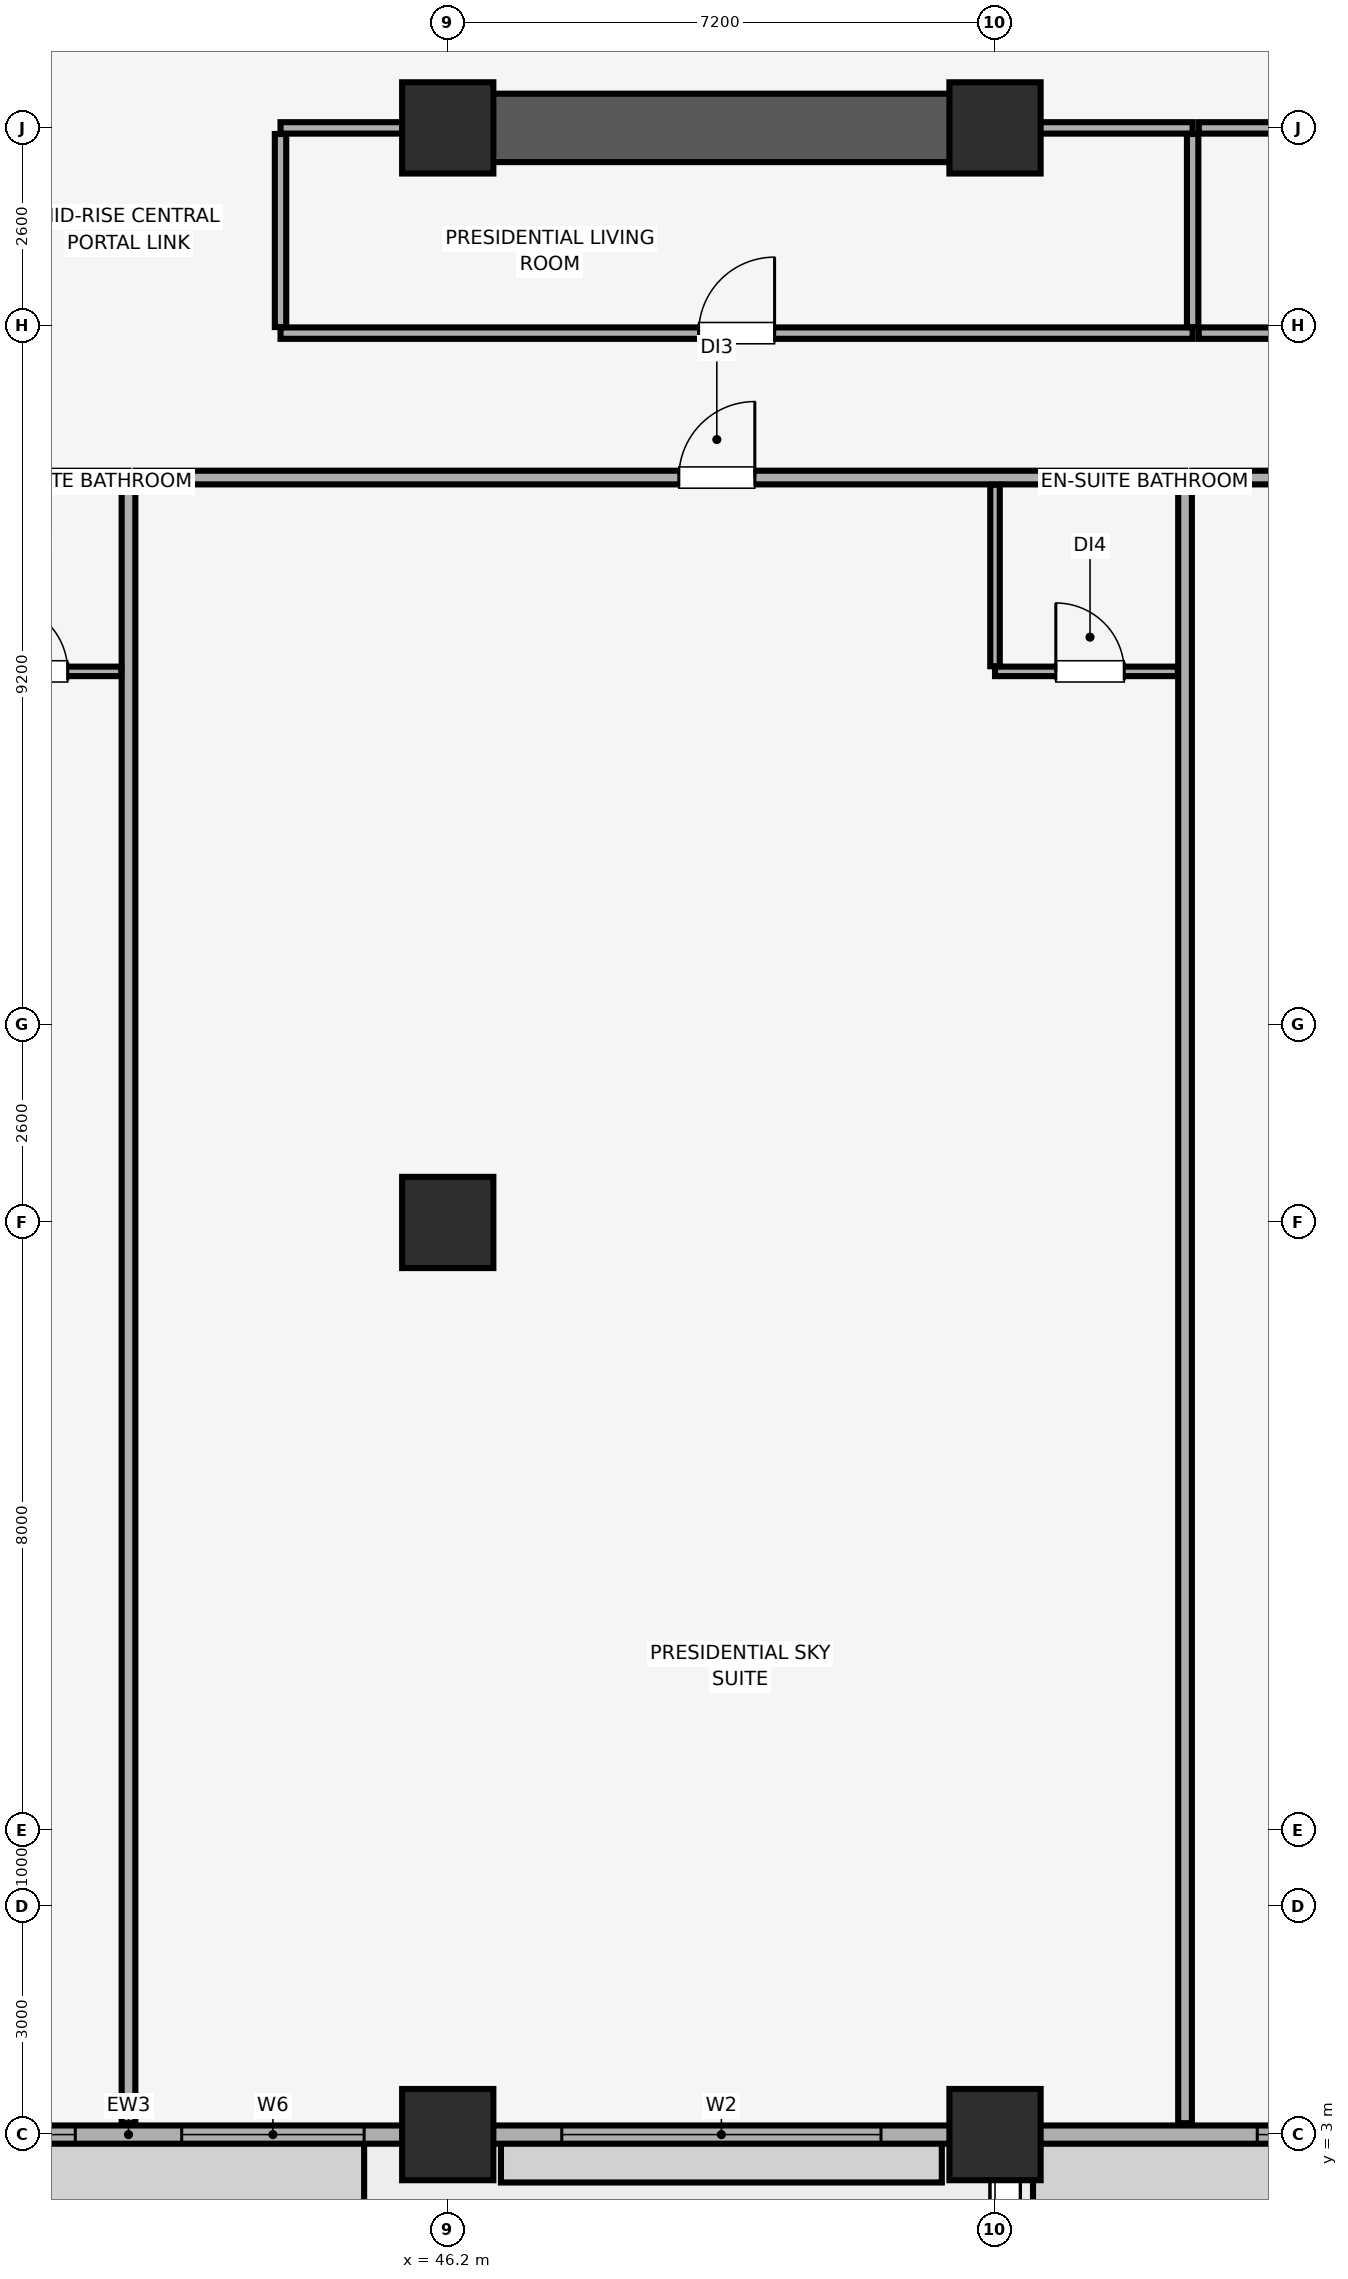
"""IFC4 building model, lengths in metres.
Left out: names, types, materials, properties, quantities, classifications, styles, units other than length and angle.
Written with IfcOpenShell. Run it as: python <this file> out.ifc"""

import sys

from ifc_helpers import new_model, si_unit, direction, frame, frame_2d, origin, origin_2d, place, context, subcontext, project, spatial, rectangle, extrude, element, fill, save


model = new_model("IFC4")
c1 = context("Model", 3, precision=1e-05, world=origin(), true_north=direction((0.0, 1.0)))
c2 = subcontext(c1, "Body", "Model", "MODEL_VIEW")
j1 = project(units=[si_unit("LENGTHUNIT", "METRE"), si_unit("PLANEANGLEUNIT", "RADIAN")], contexts=[c1])
p1 = place(None, origin())
s1 = spatial("IfcSite", under=j1, at=p1, CompositionType="ELEMENT")
p2 = place(p1, origin())
s2 = spatial("IfcBuilding", under=s1, at=p2, CompositionType="ELEMENT")
p3 = place(p2, frame((0.0, 0.0, 220.55)))
s3 = spatial("IfcBuildingStorey", under=s2, at=p3, CompositionType="ELEMENT", Elevation=220.55)
for number, where, z_axis, x_axis in (
    (1, (46.2, 3.0, 0.0), (0.0, 0.0, 1.0), (1.0, 0.0, 0.0)),
    (2, (53.4, 3.0, 0.0), (0.0, 0.0, 1.0), (1.0, 0.0, 0.0)),
    (3, (46.2, 15.0, 0.0), (0.0, 0.0, 1.0), (1.0, 0.0, 0.0)),
    (4, (46.2, 29.4, 0.0), (0.0, 0.0, 1.0), (1.0, 0.0, 0.0)),
    (5, (53.4, 29.4, 0.0), (0.0, 0.0, 1.0), (1.0, 0.0, 0.0)),
):
    element("IfcColumn", number, at=place(p3, frame(where, z_axis=z_axis, x_axis=x_axis)), inside=s3, PredefinedType="COLUMN", context=c2, shape_type="SweptSolid", body=[
        extrude(rectangle(XDim=1.2, YDim=1.2, at=origin_2d()), origin(), (0.0, 0.0, 1.0), 3.56),
    ])
p4 = place(p3, frame((7.0, 3.0, 0.0), z_axis=(0.0, 0.0, 1.0), x_axis=(1.0, 0.0, 0.0)))
e6 = element("IfcWall", 6, at=p4, inside=s3, PredefinedType="SOLIDWALL", context=c2, shape_type="SweptSolid", body=[
    extrude(rectangle(XDim=70.0, YDim=0.24, at=frame_2d((35.0, 0.0))), origin(), (0.0, 0.0, 1.0), 2.76),
])
p5 = place(p4, frame((17.86, 0.0, 0.0)))
e7 = element("IfcOpeningElement", 7, at=p5, cuts=e6, PredefinedType="OPENING", context=c2, shape_type="SweptSolid", body=[
    extrude(rectangle(XDim=1.1, YDim=2.15, at=frame_2d((0.55, 1.075))), frame((0.0, 0.13, 0.0), z_axis=(0.0, -1.0, 0.0), x_axis=(1.0, 0.0, 0.0)), (0.0, 0.0, 1.0), 0.26),
])
p6 = place(p4, frame((26.317, 0.0, 0.0)))
e8 = element("IfcOpeningElement", 8, at=p6, cuts=e6, PredefinedType="OPENING", context=c2, shape_type="SweptSolid", body=[
    extrude(rectangle(XDim=1.1, YDim=2.15, at=frame_2d((0.55, 1.075))), frame((0.0, 0.13, 0.0), z_axis=(0.0, -1.0, 0.0), x_axis=(1.0, 0.0, 0.0)), (0.0, 0.0, 1.0), 0.26),
])
p7 = place(p4, frame((57.517, 0.0, 0.0)))
e9 = element("IfcOpeningElement", 9, at=p7, cuts=e6, PredefinedType="OPENING", context=c2, shape_type="SweptSolid", body=[
    extrude(rectangle(XDim=1.1, YDim=2.15, at=frame_2d((0.55, 1.075))), frame((0.0, 0.13, 0.0), z_axis=(0.0, -1.0, 0.0), x_axis=(1.0, 0.0, 0.0)), (0.0, 0.0, 1.0), 0.26),
])
p8 = place(p4, frame((5.2, 0.0, 0.85)))
e10 = element("IfcOpeningElement", 10, at=p8, cuts=e6, PredefinedType="OPENING", context=c2, shape_type="SweptSolid", body=[
    extrude(rectangle(XDim=1.5, YDim=1.4, at=frame_2d((0.75, 0.7))), frame((0.0, 0.13, 0.0), z_axis=(0.0, -1.0, 0.0), x_axis=(1.0, 0.0, 0.0)), (0.0, 0.0, 1.0), 0.26),
])
p9 = place(p4, frame((10.7, 0.0, 0.85)))
e11 = element("IfcOpeningElement", 11, at=p9, cuts=e6, PredefinedType="OPENING", context=c2, shape_type="SweptSolid", body=[
    extrude(rectangle(XDim=4.2, YDim=1.65, at=frame_2d((2.1, 0.825))), frame((0.0, 0.13, 0.0), z_axis=(0.0, -1.0, 0.0), x_axis=(1.0, 0.0, 0.0)), (0.0, 0.0, 1.0), 0.26),
])
p10 = place(p4, frame((28.243, 0.0, 0.85)))
e12 = element("IfcOpeningElement", 12, at=p10, cuts=e6, PredefinedType="OPENING", context=c2, shape_type="SweptSolid", body=[
    extrude(rectangle(XDim=1.5, YDim=1.4, at=frame_2d((0.75, 0.7))), frame((0.0, 0.13, 0.0), z_axis=(0.0, -1.0, 0.0), x_axis=(1.0, 0.0, 0.0)), (0.0, 0.0, 1.0), 0.26),
])
p11 = place(p4, frame((31.9, 0.0, 0.85)))
e13 = element("IfcOpeningElement", 13, at=p11, cuts=e6, PredefinedType="OPENING", context=c2, shape_type="SweptSolid", body=[
    extrude(rectangle(XDim=2.4, YDim=1.5, at=frame_2d((1.2, 0.75))), frame((0.0, 0.13, 0.0), z_axis=(0.0, -1.0, 0.0), x_axis=(1.0, 0.0, 0.0)), (0.0, 0.0, 1.0), 0.26),
])
p12 = place(p4, frame((35.7, 0.0, 0.85)))
e14 = element("IfcOpeningElement", 14, at=p12, cuts=e6, PredefinedType="OPENING", context=c2, shape_type="SweptSolid", body=[
    extrude(rectangle(XDim=2.4, YDim=1.5, at=frame_2d((1.2, 0.75))), frame((0.0, 0.13, 0.0), z_axis=(0.0, -1.0, 0.0), x_axis=(1.0, 0.0, 0.0)), (0.0, 0.0, 1.0), 0.26),
])
p13 = place(p4, frame((40.7, 0.0, 0.85)))
e15 = element("IfcOpeningElement", 15, at=p13, cuts=e6, PredefinedType="OPENING", context=c2, shape_type="SweptSolid", body=[
    extrude(rectangle(XDim=4.2, YDim=1.65, at=frame_2d((2.1, 0.825))), frame((0.0, 0.13, 0.0), z_axis=(0.0, -1.0, 0.0), x_axis=(1.0, 0.0, 0.0)), (0.0, 0.0, 1.0), 0.26),
])
p14 = place(p4, frame((49.85, 0.0, 0.85)))
e16 = element("IfcOpeningElement", 16, at=p14, cuts=e6, PredefinedType="OPENING", context=c2, shape_type="SweptSolid", body=[
    extrude(rectangle(XDim=2.4, YDim=1.5, at=frame_2d((1.2, 0.75))), frame((0.0, 0.13, 0.0), z_axis=(0.0, -1.0, 0.0), x_axis=(1.0, 0.0, 0.0)), (0.0, 0.0, 1.0), 0.26),
])
p15 = place(p4, frame((54.473, 0.0, 0.85)))
e17 = element("IfcOpeningElement", 17, at=p15, cuts=e6, PredefinedType="OPENING", context=c2, shape_type="SweptSolid", body=[
    extrude(rectangle(XDim=2.4, YDim=1.5, at=frame_2d((1.2, 0.75))), frame((0.0, 0.13, 0.0), z_axis=(0.0, -1.0, 0.0), x_axis=(1.0, 0.0, 0.0)), (0.0, 0.0, 1.0), 0.26),
])
p16 = place(p4, frame((63.3, 0.0, 0.85)))
e18 = element("IfcOpeningElement", 18, at=p16, cuts=e6, PredefinedType="OPENING", context=c2, shape_type="SweptSolid", body=[
    extrude(rectangle(XDim=1.5, YDim=1.4, at=frame_2d((0.75, 0.7))), frame((0.0, 0.13, 0.0), z_axis=(0.0, -1.0, 0.0), x_axis=(1.0, 0.0, 0.0)), (0.0, 0.0, 1.0), 0.26),
])
p17 = place(p3, frame((46.0, 29.4, 0.0), z_axis=(0.0, 0.0, 1.0), x_axis=(1.0, 0.0, 0.0)))
e19 = element("IfcWall", 19, at=p17, inside=s3, PredefinedType="SHEAR", context=c2, shape_type="SweptSolid", body=[
    extrude(rectangle(XDim=7.6, YDim=0.9, at=frame_2d((3.8, 0.0))), origin(), (0.0, 0.0, 1.0), 3.56),
])
p18 = place(p3, frame((28.195, 24.8, 0.0), z_axis=(0.0, 0.0, 1.0), x_axis=(1.0, 0.0, 0.0)))
e20 = element("IfcWall", 20, at=p18, inside=s3, PredefinedType="PARTITIONING", context=c2, shape_type="SweptSolid", body=[
    extrude(rectangle(XDim=13.805, YDim=0.18, at=frame_2d((6.902, 0.0))), origin(), (0.0, 0.0, 1.0), 3.56),
])
p19 = place(p18, frame((5.505, 0.0, 0.0)))
e21 = element("IfcOpeningElement", 21, at=p19, cuts=e20, PredefinedType="OPENING", context=c2, shape_type="SweptSolid", body=[
    extrude(rectangle(XDim=1.0, YDim=2.15, at=frame_2d((0.5, 1.075))), frame((0.0, 0.1, 0.0), z_axis=(0.0, -1.0, 0.0), x_axis=(1.0, 0.0, 0.0)), (0.0, 0.0, 1.0), 0.2),
])
p20 = place(p3, frame((42.0, 3.15, 0.0), z_axis=(0.0, 0.0, 1.0), x_axis=(0.0, 1.0, 0.0)))
e22 = element("IfcWall", 22, at=p20, inside=s3, PredefinedType="PARTITIONING", context=c2, shape_type="SweptSolid", body=[
    extrude(rectangle(XDim=21.555, YDim=0.18, at=frame_2d((10.778, 0.0))), origin(), (0.0, 0.0, 1.0), 2.96),
])
p21 = place(p3, frame((39.5, 22.25, 0.0), z_axis=(0.0, 0.0, 1.0), x_axis=(1.0, 0.0, 0.0)))
e23 = element("IfcWall", 23, at=p21, inside=s3, PredefinedType="PARTITIONING", context=c2, shape_type="SweptSolid", body=[
    extrude(rectangle(XDim=2.405, YDim=0.125, at=frame_2d((1.203, 0.0))), origin(), (0.0, 0.0, 1.0), 3.56),
])
p22 = place(p21, frame((0.8, 0.0, 0.0)))
e24 = element("IfcOpeningElement", 24, at=p22, cuts=e23, PredefinedType="OPENING", context=c2, shape_type="SweptSolid", body=[
    extrude(rectangle(XDim=0.9, YDim=2.1, at=frame_2d((0.45, 1.05))), frame((0.0, 0.073, 0.0), z_axis=(0.0, -1.0, 0.0), x_axis=(1.0, 0.0, 0.0)), (0.0, 0.0, 1.0), 0.145),
])
p23 = place(p3, frame((42.095, 24.8, 0.0), z_axis=(0.0, 0.0, 1.0), x_axis=(1.0, 0.0, 0.0)))
e25 = element("IfcWall", 25, at=p23, inside=s3, PredefinedType="PARTITIONING", context=c2, shape_type="SweptSolid", body=[
    extrude(rectangle(XDim=13.805, YDim=0.18, at=frame_2d((6.902, 0.0))), origin(), (0.0, 0.0, 1.0), 3.56),
])
p24 = place(p23, frame((7.145, 0.0, 0.0)))
e26 = element("IfcOpeningElement", 26, at=p24, cuts=e25, PredefinedType="OPENING", context=c2, shape_type="SweptSolid", body=[
    extrude(rectangle(XDim=1.0, YDim=2.15, at=frame_2d((0.5, 1.075))), frame((0.0, 0.1, 0.0), z_axis=(0.0, -1.0, 0.0), x_axis=(1.0, 0.0, 0.0)), (0.0, 0.0, 1.0), 0.2),
])
p25 = place(p3, frame((55.9, 3.15, 0.0), z_axis=(0.0, 0.0, 1.0), x_axis=(0.0, 1.0, 0.0)))
e27 = element("IfcWall", 27, at=p25, inside=s3, PredefinedType="PARTITIONING", context=c2, shape_type="SweptSolid", body=[
    extrude(rectangle(XDim=21.555, YDim=0.18, at=frame_2d((10.778, 0.0))), origin(), (0.0, 0.0, 1.0), 3.56),
])
p26 = place(p3, frame((53.4, 22.25, 0.0), z_axis=(0.0, 0.0, 1.0), x_axis=(1.0, 0.0, 0.0)))
e28 = element("IfcWall", 28, at=p26, inside=s3, PredefinedType="PARTITIONING", context=c2, shape_type="SweptSolid", body=[
    extrude(rectangle(XDim=2.405, YDim=0.125, at=frame_2d((1.203, 0.0))), origin(), (0.0, 0.0, 1.0), 3.56),
])
p27 = place(p26, frame((0.8, 0.0, 0.0)))
e29 = element("IfcOpeningElement", 29, at=p27, cuts=e28, PredefinedType="OPENING", context=c2, shape_type="SweptSolid", body=[
    extrude(rectangle(XDim=0.9, YDim=2.1, at=frame_2d((0.45, 1.05))), frame((0.0, 0.073, 0.0), z_axis=(0.0, -1.0, 0.0), x_axis=(1.0, 0.0, 0.0)), (0.0, 0.0, 1.0), 0.145),
])
p28 = place(p3, frame((53.4, 22.317, 0.0), z_axis=(0.0, 0.0, 1.0), x_axis=(0.0, 1.0, 0.0)))
e30 = element("IfcWall", 30, at=p28, inside=s3, PredefinedType="PARTITIONING", context=c2, shape_type="SweptSolid", body=[
    extrude(rectangle(XDim=2.388, YDim=0.125, at=frame_2d((1.194, 0.0))), origin(), (0.0, 0.0, 1.0), 3.06),
])
p29 = place(p3, frame((55.995, 24.8, 0.0), z_axis=(0.0, 0.0, 1.0), x_axis=(1.0, 0.0, 0.0)))
e31 = element("IfcWall", 31, at=p29, inside=s3, PredefinedType="PARTITIONING", context=c2, shape_type="SweptSolid", body=[
    extrude(rectangle(XDim=13.805, YDim=0.18, at=frame_2d((6.902, 0.0))), origin(), (0.0, 0.0, 1.0), 3.56),
])
p30 = place(p29, frame((7.395, 0.0, 0.0)))
e32 = element("IfcOpeningElement", 32, at=p30, cuts=e31, PredefinedType="OPENING", context=c2, shape_type="SweptSolid", body=[
    extrude(rectangle(XDim=1.0, YDim=2.15, at=frame_2d((0.5, 1.075))), frame((0.0, 0.1, 0.0), z_axis=(0.0, -1.0, 0.0), x_axis=(1.0, 0.0, 0.0)), (0.0, 0.0, 1.0), 0.2),
])
p31 = place(p3, frame((44.0, 26.7, 0.0), z_axis=(0.0, 0.0, 1.0), x_axis=(1.0, 0.0, 0.0)))
e33 = element("IfcWall", 33, at=p31, inside=s3, PredefinedType="PARTITIONING", context=c2, shape_type="SweptSolid", body=[
    extrude(rectangle(XDim=12.0, YDim=0.15, at=frame_2d((6.0, 0.0))), origin(), (0.0, 0.0, 1.0), 3.56),
])
p32 = place(p31, frame((5.5, 0.0, 0.0)))
e34 = element("IfcOpeningElement", 34, at=p32, cuts=e33, PredefinedType="OPENING", context=c2, shape_type="SweptSolid", body=[
    extrude(rectangle(XDim=1.0, YDim=2.15, at=frame_2d((0.5, 1.075))), frame((0.0, 0.085, 0.0), z_axis=(0.0, -1.0, 0.0), x_axis=(1.0, 0.0, 0.0)), (0.0, 0.0, 1.0), 0.17),
])
p33 = place(p3, frame((44.0, 29.4, 0.0), z_axis=(0.0, 0.0, 1.0), x_axis=(1.0, 0.0, 0.0)))
e35 = element("IfcWall", 35, at=p33, inside=s3, PredefinedType="PARTITIONING", context=c2, shape_type="SweptSolid", body=[
    extrude(rectangle(XDim=1.99, YDim=0.15, at=frame_2d((0.995, 0.0))), origin(), (0.0, 0.0, 1.0), 2.46),
])
p34 = place(p3, frame((53.61, 29.4, 0.0), z_axis=(0.0, 0.0, 1.0), x_axis=(1.0, 0.0, 0.0)))
e36 = element("IfcWall", 36, at=p34, inside=s3, PredefinedType="PARTITIONING", context=c2, shape_type="SweptSolid", body=[
    extrude(rectangle(XDim=2.39, YDim=0.15, at=frame_2d((1.195, 0.0))), origin(), (0.0, 0.0, 1.0), 2.46),
])
for number, where, z_axis, x_axis in (
    (37, (44.0, 26.78, 0.0), (0.0, 0.0, 1.0), (0.0, 1.0, 0.0)),
    (38, (56.0, 26.78, 0.0), (0.0, 0.0, 1.0), (0.0, 1.0, 0.0)),
):
    element("IfcWall", number, at=place(p3, frame(where, z_axis=z_axis, x_axis=x_axis)), inside=s3, PredefinedType="PARTITIONING", context=c2, shape_type="SweptSolid", body=[
        extrude(rectangle(XDim=2.54, YDim=0.15, at=frame_2d((1.27, 0.0))), origin(), (0.0, 0.0, 1.0), 3.56),
    ])
p35 = place(p3, frame((56.08, 26.7, 0.0), z_axis=(0.0, 0.0, 1.0), x_axis=(1.0, 0.0, 0.0)))
e39 = element("IfcWall", 39, at=p35, inside=s3, PredefinedType="PARTITIONING", context=c2, shape_type="SweptSolid", body=[
    extrude(rectangle(XDim=11.92, YDim=0.15, at=frame_2d((5.96, 0.0))), origin(), (0.0, 0.0, 1.0), 3.56),
])
p36 = place(p35, frame((5.42, 0.0, 0.0)))
e40 = element("IfcOpeningElement", 40, at=p36, cuts=e39, PredefinedType="OPENING", context=c2, shape_type="SweptSolid", body=[
    extrude(rectangle(XDim=1.0, YDim=2.15, at=frame_2d((0.5, 1.075))), frame((0.0, 0.085, 0.0), z_axis=(0.0, -1.0, 0.0), x_axis=(1.0, 0.0, 0.0)), (0.0, 0.0, 1.0), 0.17),
])
p37 = place(p3, frame((56.08, 29.4, 0.0), z_axis=(0.0, 0.0, 1.0), x_axis=(1.0, 0.0, 0.0)))
e41 = element("IfcWall", 41, at=p37, inside=s3, PredefinedType="PARTITIONING", context=c2, shape_type="SweptSolid", body=[
    extrude(rectangle(XDim=4.31, YDim=0.15, at=frame_2d((2.155, 0.0))), origin(), (0.0, 0.0, 1.0), 2.46),
])
p38 = place(p11, origin())
e42 = element("IfcWindow", 42, at=p38, inside=s3, PartitioningType="SINGLE_PANEL", PredefinedType="WINDOW", context=c2, shape_type="SweptSolid", body=[
    extrude(rectangle(XDim=2.4, YDim=1.5, at=frame_2d((1.2, 0.75))), frame((0.0, 0.03, 0.0), z_axis=(0.0, -1.0, 0.0), x_axis=(1.0, 0.0, 0.0)), (0.0, 0.0, 1.0), 0.06),
])
fill(e13, e42)
p39 = place(p12, origin())
e43 = element("IfcWindow", 43, at=p39, inside=s3, PartitioningType="SINGLE_PANEL", PredefinedType="WINDOW", context=c2, shape_type="SweptSolid", body=[
    extrude(rectangle(XDim=2.4, YDim=1.5, at=frame_2d((1.2, 0.75))), frame((0.0, 0.03, 0.0), z_axis=(0.0, -1.0, 0.0), x_axis=(1.0, 0.0, 0.0)), (0.0, 0.0, 1.0), 0.06),
])
fill(e14, e43)
p40 = place(p13, origin())
e44 = element("IfcWindow", 44, at=p40, inside=s3, PartitioningType="SINGLE_PANEL", PredefinedType="WINDOW", context=c2, shape_type="SweptSolid", body=[
    extrude(rectangle(XDim=4.2, YDim=1.65, at=frame_2d((2.1, 0.825))), frame((0.0, 0.03, 0.0), z_axis=(0.0, -1.0, 0.0), x_axis=(1.0, 0.0, 0.0)), (0.0, 0.0, 1.0), 0.06),
])
fill(e15, e44)
p41 = place(p14, origin())
e45 = element("IfcWindow", 45, at=p41, inside=s3, PartitioningType="SINGLE_PANEL", PredefinedType="WINDOW", context=c2, shape_type="SweptSolid", body=[
    extrude(rectangle(XDim=2.4, YDim=1.5, at=frame_2d((1.2, 0.75))), frame((0.0, 0.03, 0.0), z_axis=(0.0, -1.0, 0.0), x_axis=(1.0, 0.0, 0.0)), (0.0, 0.0, 1.0), 0.06),
])
fill(e16, e45)
p42 = place(p22, origin())
e46 = element("IfcDoor", 46, at=p42, inside=s3, OperationType="SINGLE_SWING_LEFT", PredefinedType="DOOR", context=c2, shape_type="SweptSolid", body=[
    extrude(rectangle(XDim=0.9, YDim=2.1, at=frame_2d((0.45, 1.05))), frame((0.0, 0.025, 0.0), z_axis=(0.0, -1.0, 0.0), x_axis=(1.0, 0.0, 0.0)), (0.0, 0.0, 1.0), 0.05),
])
fill(e24, e46)
p43 = place(p24, origin())
e47 = element("IfcDoor", 47, at=p43, inside=s3, OperationType="SINGLE_SWING_RIGHT", PredefinedType="DOOR", context=c2, shape_type="SweptSolid", body=[
    extrude(rectangle(XDim=1.0, YDim=2.15, at=frame_2d((0.5, 1.075))), frame((0.0, 0.025, 0.0), z_axis=(0.0, -1.0, 0.0), x_axis=(1.0, 0.0, 0.0)), (0.0, 0.0, 1.0), 0.05),
])
fill(e26, e47)
p44 = place(p27, origin())
e48 = element("IfcDoor", 48, at=p44, inside=s3, OperationType="SINGLE_SWING_LEFT", PredefinedType="DOOR", context=c2, shape_type="SweptSolid", body=[
    extrude(rectangle(XDim=0.9, YDim=2.1, at=frame_2d((0.45, 1.05))), frame((0.0, 0.025, 0.0), z_axis=(0.0, -1.0, 0.0), x_axis=(1.0, 0.0, 0.0)), (0.0, 0.0, 1.0), 0.05),
])
fill(e29, e48)
p45 = place(p32, origin())
e49 = element("IfcDoor", 49, at=p45, inside=s3, OperationType="SINGLE_SWING_RIGHT", PredefinedType="DOOR", context=c2, shape_type="SweptSolid", body=[
    extrude(rectangle(XDim=1.0, YDim=2.15, at=frame_2d((0.5, 1.075))), frame((0.0, 0.025, 0.0), z_axis=(0.0, -1.0, 0.0), x_axis=(1.0, 0.0, 0.0)), (0.0, 0.0, 1.0), 0.05),
])
fill(e34, e49)
save(model, sys.argv[1])
